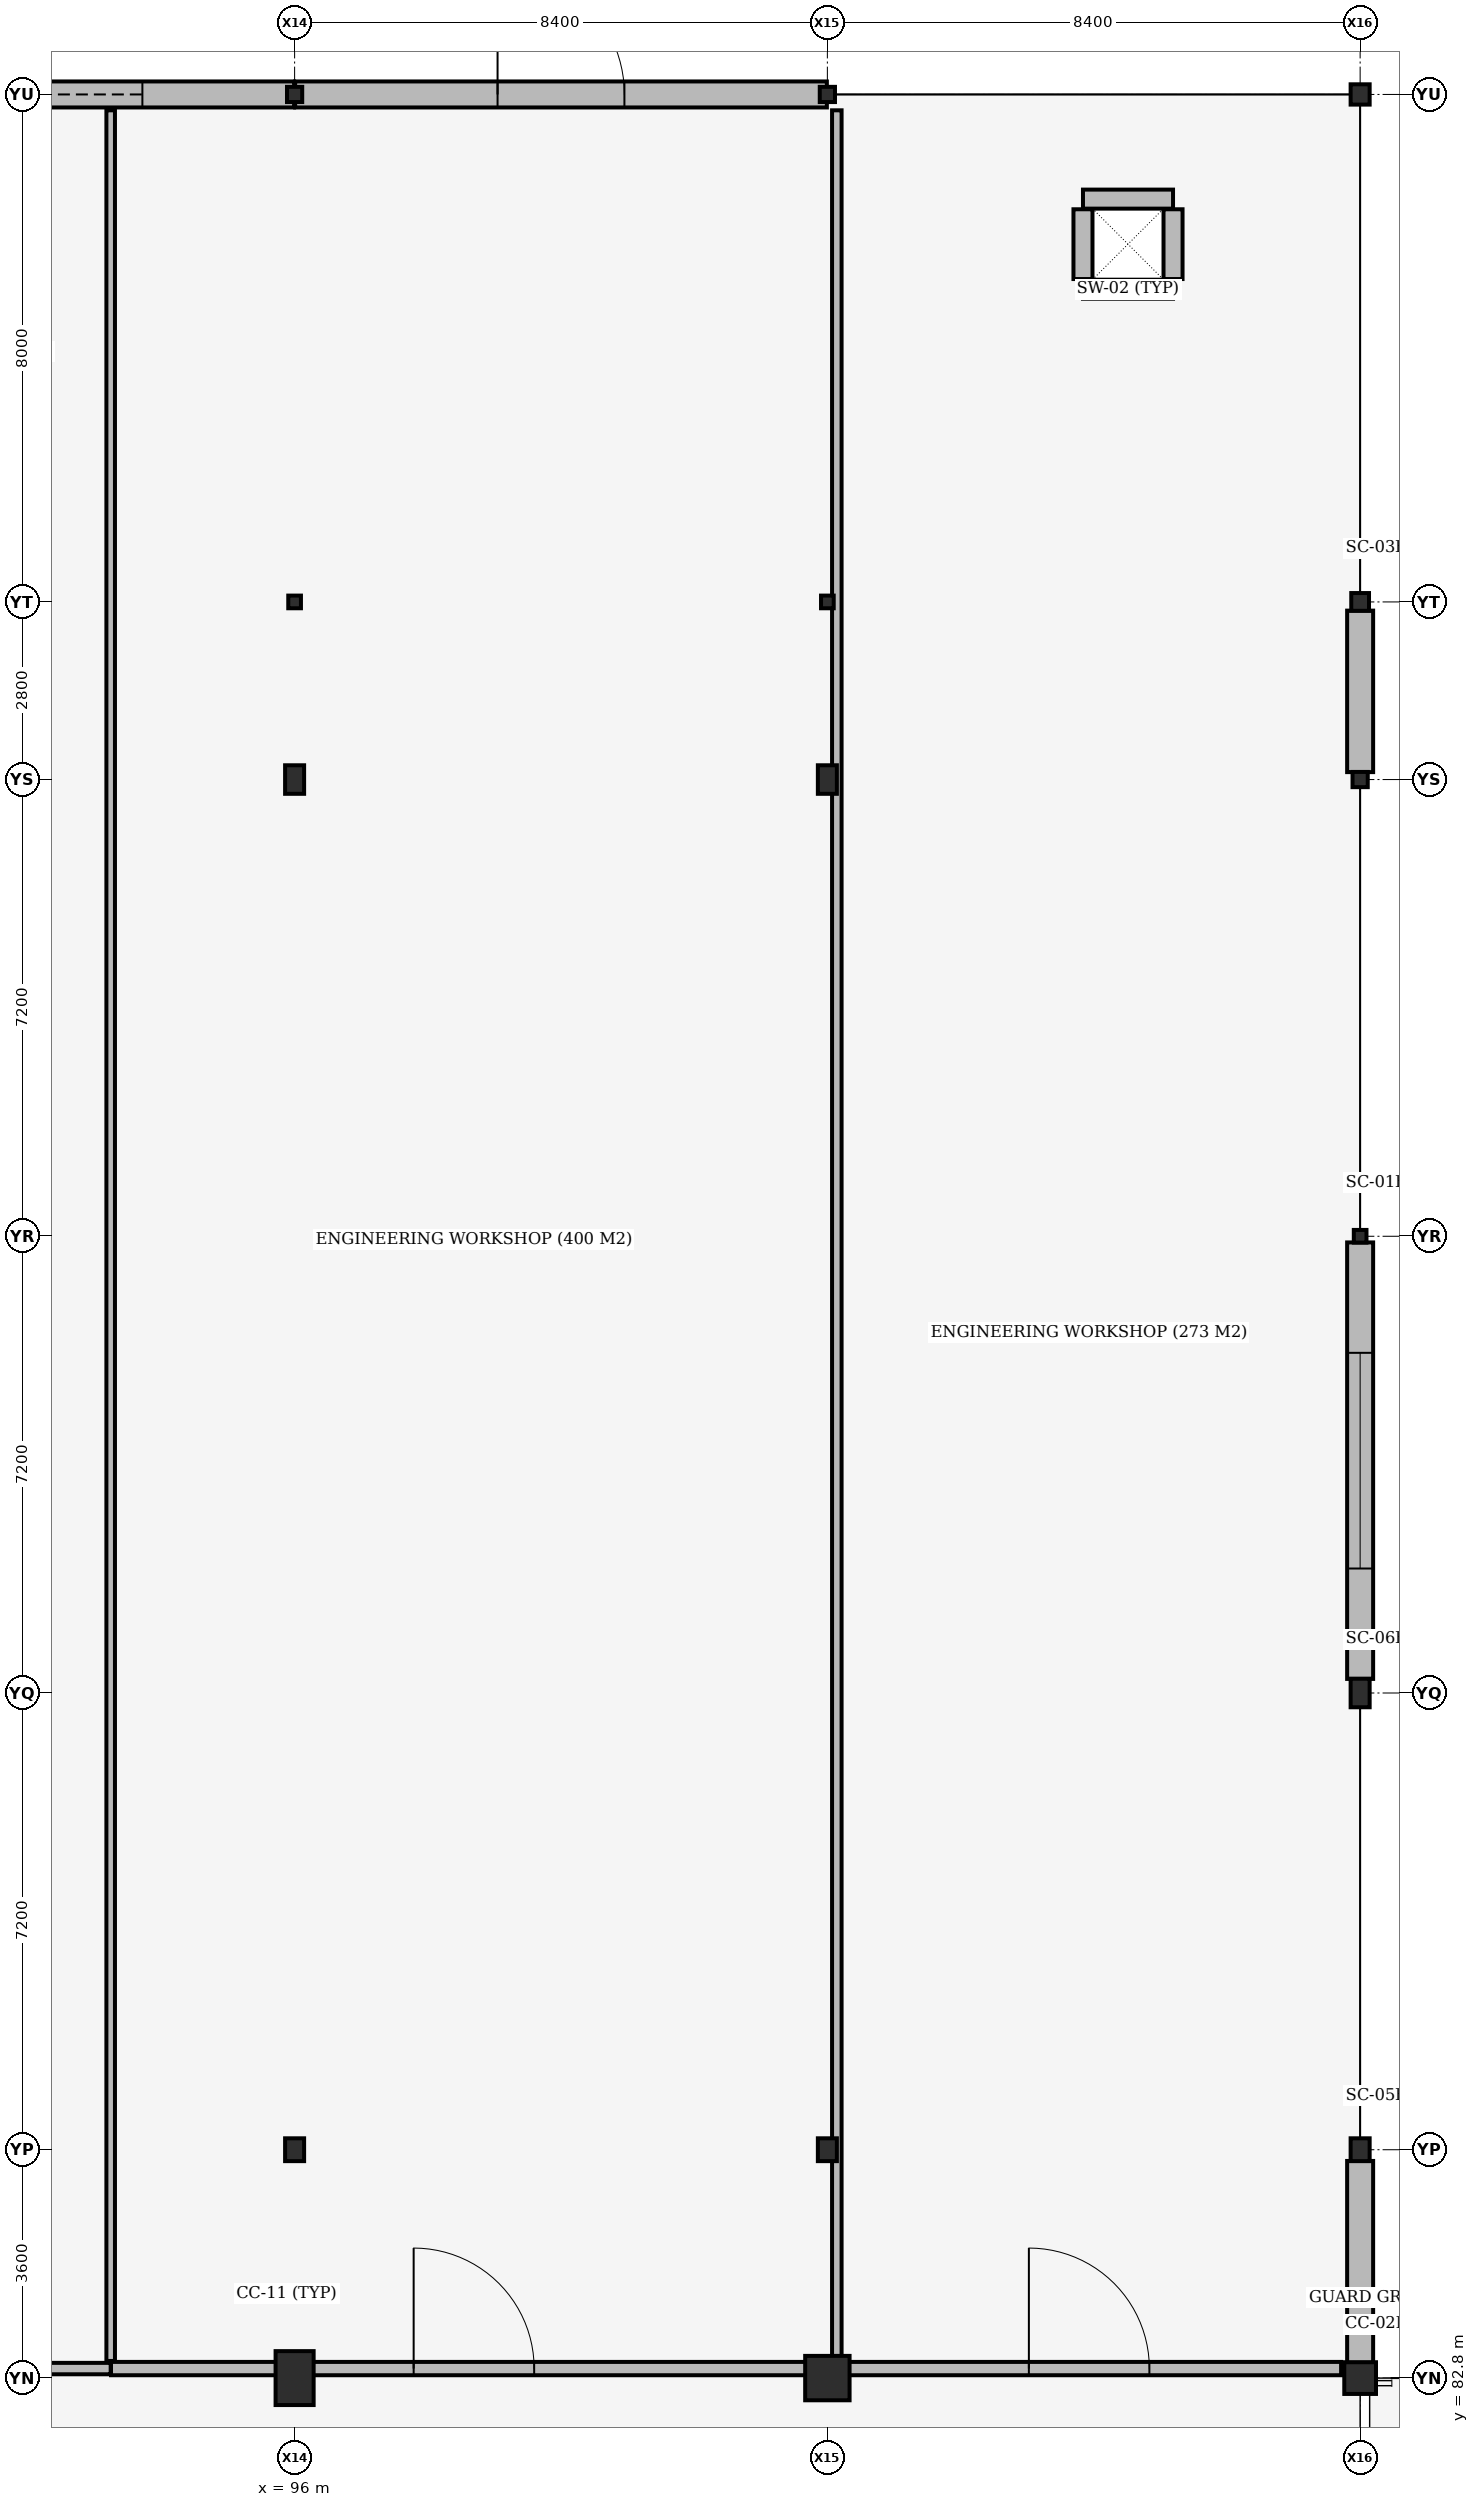
"""IFC4 building model, lengths in metres.
Left out: names, types, materials, properties, quantities, classifications, styles, units other than length and angle.
Written with IfcOpenShell. Run it as: python <this file> out.ifc"""

import sys

from ifc_helpers import new_model, si_unit, direction, frame, frame_2d, origin, origin_2d, place, context, subcontext, project, spatial, rectangle, i_section, extrude, element, fill, save


model = new_model("IFC4")
c1 = context("Model", 3, precision=1e-05, world=origin(), true_north=direction((0.0, 1.0)))
c2 = subcontext(c1, "Body", "Model", "MODEL_VIEW")
j1 = project(units=[si_unit("LENGTHUNIT", "METRE"), si_unit("PLANEANGLEUNIT", "RADIAN")], contexts=[c1])
p1 = place(None, origin())
s1 = spatial("IfcSite", under=j1, at=p1, CompositionType="ELEMENT")
p2 = place(p1, origin())
s2 = spatial("IfcBuilding", under=s1, at=p2, CompositionType="ELEMENT")
p3 = place(p2, origin())
s3 = spatial("IfcBuildingStorey", under=s2, at=p3, CompositionType="ELEMENT", Elevation=0.0)
p4 = place(p3, frame((108.43, 115.73, 0.0), z_axis=(0.0, 0.0, 1.0), x_axis=(1.0, 0.0, 0.0)))
e1 = element("IfcWall", 1, at=p4, inside=s3, PredefinedType="SHEAR", context=c2, shape_type="SweptSolid", body=[
    extrude(rectangle(XDim=1.42, YDim=0.3, at=frame_2d((0.71, 0.0))), origin(), (0.0, 0.0, 1.0), 5.16),
])
p5 = place(p3, frame((109.85, 115.89, 0.0), z_axis=(0.0, 0.0, 1.0), x_axis=(0.0, 1.0, 0.0)))
e2 = element("IfcWall", 2, at=p5, inside=s3, PredefinedType="SHEAR", context=c2, shape_type="SweptSolid", body=[
    extrude(rectangle(XDim=1.1, YDim=0.3, at=frame_2d((0.55, 0.0))), origin(), (0.0, 0.0, 1.0), 5.16),
])
p6 = place(p3, frame((109.85, 117.15, 0.0), z_axis=(0.0, 0.0, 1.0), x_axis=(-1.0, 0.0, 0.0)))
e3 = element("IfcWall", 3, at=p6, inside=s3, PredefinedType="SHEAR", context=c2, shape_type="SweptSolid", body=[
    extrude(rectangle(XDim=1.42, YDim=0.3, at=frame_2d((0.71, 0.0))), origin(), (0.0, 0.0, 1.0), 5.16),
])
p7 = place(p3, frame((108.43, 116.99, 0.0), z_axis=(0.0, 0.0, 1.0), x_axis=(0.0, -1.0, 0.0)))
e4 = element("IfcWall", 4, at=p7, inside=s3, PredefinedType="SHEAR", context=c2, shape_type="SweptSolid", body=[
    extrude(rectangle(XDim=1.1, YDim=0.3, at=frame_2d((0.55, 0.0))), origin(), (0.0, 0.0, 1.0), 5.16),
])
p8 = place(p3, frame((96.0, 82.8, 0.0), z_axis=(0.0, 0.0, 1.0), x_axis=(1.0, 0.0, 0.0)))
e5 = element("IfcColumn", 5, at=p8, inside=s3, PredefinedType="COLUMN", context=c2, shape_type="SweptSolid", body=[
    extrude(rectangle(XDim=0.6, YDim=0.85, at=origin_2d()), origin(), (0.0, 0.0, 1.0), 5.08),
])
p9 = place(p3, frame((96.0, 86.4, 0.0), z_axis=(0.0, 0.0, 1.0), x_axis=(1.0, 0.0, 0.0)))
e6 = element("IfcColumn", 6, at=p9, inside=s3, PredefinedType="COLUMN", context=c2, shape_type="SweptSolid", body=[
    extrude(i_section(OverallWidth=0.3, OverallDepth=0.36, WebThickness=0.012, FlangeThickness=0.022, FilletRadius=0.027, at=origin_2d()), origin(), (0.0, 0.0, 1.0), 5.08),
])
p10 = place(p3, frame((96.0, 108.0, 0.0), z_axis=(0.0, 0.0, 1.0), x_axis=(1.0, 0.0, 0.0)))
e7 = element("IfcColumn", 7, at=p10, inside=s3, PredefinedType="COLUMN", context=c2, shape_type="SweptSolid", body=[
    extrude(i_section(OverallWidth=0.3, OverallDepth=0.45, WebThickness=0.014, FlangeThickness=0.026, FilletRadius=0.027, at=origin_2d()), origin(), (0.0, 0.0, 1.0), 5.4),
])
p11 = place(p3, frame((96.0, 110.8, 0.0), z_axis=(0.0, 0.0, 1.0), x_axis=(1.0, 0.0, 0.0)))
e8 = element("IfcColumn", 8, at=p11, inside=s3, PredefinedType="COLUMN", context=c2, shape_type="SweptSolid", body=[
    extrude(i_section(OverallWidth=0.2, OverallDepth=0.2, WebThickness=0.009, FlangeThickness=0.015, FilletRadius=0.018, at=origin_2d()), origin(), (0.0, 0.0, 1.0), 5.16),
])
p12 = place(p3, frame((96.0, 118.8, 0.0), z_axis=(0.0, 0.0, 1.0), x_axis=(1.0, 0.0, 0.0)))
e9 = element("IfcColumn", 9, at=p12, inside=s3, PredefinedType="COLUMN", context=c2, shape_type="SweptSolid", body=[
    extrude(i_section(OverallWidth=0.24, OverallDepth=0.24, WebThickness=0.01, FlangeThickness=0.017, FilletRadius=0.021, at=origin_2d()), origin(), (0.0, 0.0, 1.0), 5.16),
])
p13 = place(p3, frame((104.4, 82.8, 0.0), z_axis=(0.0, 0.0, 1.0), x_axis=(1.0, 0.0, 0.0)))
e10 = element("IfcColumn", 10, at=p13, inside=s3, PredefinedType="COLUMN", context=c2, shape_type="SweptSolid", body=[
    extrude(rectangle(XDim=0.7, YDim=0.7, at=origin_2d()), origin(), (0.0, 0.0, 1.0), 5.08),
])
p14 = place(p3, frame((104.4, 86.4, 0.0), z_axis=(0.0, 0.0, 1.0), x_axis=(1.0, 0.0, 0.0)))
e11 = element("IfcColumn", 11, at=p14, inside=s3, PredefinedType="COLUMN", context=c2, shape_type="SweptSolid", body=[
    extrude(i_section(OverallWidth=0.3, OverallDepth=0.36, WebThickness=0.012, FlangeThickness=0.022, FilletRadius=0.027, at=origin_2d()), origin(), (0.0, 0.0, 1.0), 5.08),
])
p15 = place(p3, frame((104.4, 108.0, 0.0), z_axis=(0.0, 0.0, 1.0), x_axis=(1.0, 0.0, 0.0)))
e12 = element("IfcColumn", 12, at=p15, inside=s3, PredefinedType="COLUMN", context=c2, shape_type="SweptSolid", body=[
    extrude(i_section(OverallWidth=0.3, OverallDepth=0.45, WebThickness=0.014, FlangeThickness=0.026, FilletRadius=0.027, at=origin_2d()), origin(), (0.0, 0.0, 1.0), 5.4),
])
p16 = place(p3, frame((104.4, 110.8, 0.0), z_axis=(0.0, 0.0, 1.0), x_axis=(1.0, 0.0, 0.0)))
e13 = element("IfcColumn", 13, at=p16, inside=s3, PredefinedType="COLUMN", context=c2, shape_type="SweptSolid", body=[
    extrude(i_section(OverallWidth=0.2, OverallDepth=0.2, WebThickness=0.009, FlangeThickness=0.015, FilletRadius=0.018, at=origin_2d()), origin(), (0.0, 0.0, 1.0), 5.16),
])
p17 = place(p3, frame((104.4, 118.8, 0.0), z_axis=(0.0, 0.0, 1.0), x_axis=(1.0, 0.0, 0.0)))
e14 = element("IfcColumn", 14, at=p17, inside=s3, PredefinedType="COLUMN", context=c2, shape_type="SweptSolid", body=[
    extrude(i_section(OverallWidth=0.24, OverallDepth=0.24, WebThickness=0.01, FlangeThickness=0.017, FilletRadius=0.021, at=origin_2d()), origin(), (0.0, 0.0, 1.0), 5.16),
])
p18 = place(p3, frame((112.8, 82.8, 0.0), z_axis=(0.0, 0.0, 1.0), x_axis=(1.0, 0.0, 0.0)))
e15 = element("IfcColumn", 15, at=p18, inside=s3, PredefinedType="COLUMN", context=c2, shape_type="SweptSolid", body=[
    extrude(rectangle(XDim=0.5, YDim=0.5, at=origin_2d()), origin(), (0.0, 0.0, 1.0), 5.08),
])
p19 = place(p3, frame((112.8, 86.4, 0.0), z_axis=(0.0, 0.0, 1.0), x_axis=(1.0, 0.0, 0.0)))
e16 = element("IfcColumn", 16, at=p19, inside=s3, PredefinedType="COLUMN", context=c2, shape_type="SweptSolid", body=[
    extrude(i_section(OverallWidth=0.3, OverallDepth=0.36, WebThickness=0.012, FlangeThickness=0.022, FilletRadius=0.027, at=origin_2d()), origin(), (0.0, 0.0, 1.0), 5.08),
])
p20 = place(p3, frame((112.8, 93.6, 0.0), z_axis=(0.0, 0.0, 1.0), x_axis=(1.0, 0.0, 0.0)))
e17 = element("IfcColumn", 17, at=p20, inside=s3, PredefinedType="COLUMN", context=c2, shape_type="SweptSolid", body=[
    extrude(i_section(OverallWidth=0.3, OverallDepth=0.45, WebThickness=0.014, FlangeThickness=0.026, FilletRadius=0.027, at=origin_2d()), origin(), (0.0, 0.0, 1.0), 5.08),
])
p21 = place(p3, frame((112.8, 100.8, 0.0), z_axis=(0.0, 0.0, 1.0), x_axis=(1.0, 0.0, 0.0)))
e18 = element("IfcColumn", 18, at=p21, inside=s3, PredefinedType="COLUMN", context=c2, shape_type="SweptSolid", body=[
    extrude(i_section(OverallWidth=0.2, OverallDepth=0.2, WebThickness=0.009, FlangeThickness=0.015, FilletRadius=0.018, at=origin_2d()), origin(), (0.0, 0.0, 1.0), 5.08),
])
p22 = place(p3, frame((112.8, 108.0, 0.0), z_axis=(0.0, 0.0, 1.0), x_axis=(1.0, 0.0, 0.0)))
e19 = element("IfcColumn", 19, at=p22, inside=s3, PredefinedType="COLUMN", context=c2, shape_type="SweptSolid", body=[
    extrude(i_section(OverallWidth=0.24, OverallDepth=0.24, WebThickness=0.01, FlangeThickness=0.017, FilletRadius=0.021, at=origin_2d()), origin(), (0.0, 0.0, 1.0), 5.4),
])
p23 = place(p3, frame((112.8, 110.8, 0.0), z_axis=(0.0, 0.0, 1.0), x_axis=(1.0, 0.0, 0.0)))
e20 = element("IfcColumn", 20, at=p23, inside=s3, PredefinedType="COLUMN", context=c2, shape_type="SweptSolid", body=[
    extrude(i_section(OverallWidth=0.28, OverallDepth=0.28, WebThickness=0.01, FlangeThickness=0.018, FilletRadius=0.024, at=origin_2d()), origin(), (0.0, 0.0, 1.0), 5.16),
])
p24 = place(p3, frame((112.8, 118.8, 0.0), z_axis=(0.0, 0.0, 1.0), x_axis=(1.0, 0.0, 0.0)))
e21 = element("IfcColumn", 21, at=p24, inside=s3, PredefinedType="COLUMN", context=c2, shape_type="SweptSolid", body=[
    extrude(i_section(OverallWidth=0.3, OverallDepth=0.32, WebThickness=0.011, FlangeThickness=0.021, FilletRadius=0.027, at=origin_2d()), origin(), (0.0, 0.0, 1.0), 5.16),
])
p25 = place(p3, frame((87.608, 118.8, 0.0), z_axis=(0.0, 0.0, 1.0), x_axis=(1.0, 0.0, 0.0)))
e22 = element("IfcWall", 22, at=p25, inside=s3, PredefinedType="STANDARD", context=c2, shape_type="SweptSolid", body=[
    extrude(rectangle(XDim=8.384, YDim=0.41, at=frame_2d((4.192, 0.0))), origin(), (0.0, 0.0, 1.0), 5.08),
])
p26 = place(p25, frame((2.392, 0.0, 0.0)))
e23 = element("IfcOpeningElement", 23, at=p26, cuts=e22, PredefinedType="OPENING", context=c2, shape_type="SweptSolid", body=[
    extrude(rectangle(XDim=3.6, YDim=3.8, at=frame_2d((1.8, 1.9))), frame((0.0, 0.215, 0.0), z_axis=(0.0, -1.0, 0.0), x_axis=(1.0, 0.0, 0.0)), (0.0, 0.0, 1.0), 0.43),
])
p27 = place(p3, frame((96.008, 118.8, 0.0), z_axis=(0.0, 0.0, 1.0), x_axis=(1.0, 0.0, 0.0)))
e24 = element("IfcWall", 24, at=p27, inside=s3, PredefinedType="STANDARD", context=c2, shape_type="SweptSolid", body=[
    extrude(rectangle(XDim=8.384, YDim=0.41, at=frame_2d((4.192, 0.0))), origin(), (0.0, 0.0, 1.0), 5.08),
])
p28 = place(p27, frame((3.192, 0.0, 0.0)))
e25 = element("IfcOpeningElement", 25, at=p28, cuts=e24, PredefinedType="OPENING", context=c2, shape_type="SweptSolid", body=[
    extrude(rectangle(XDim=2.0, YDim=2.3, at=frame_2d((1.0, 1.15))), frame((0.0, 0.215, 0.0), z_axis=(0.0, -1.0, 0.0), x_axis=(1.0, 0.0, 0.0)), (0.0, 0.0, 1.0), 0.43),
])
p29 = place(p3, frame((112.8, 86.223, 0.0), z_axis=(0.0, 0.0, 1.0), x_axis=(0.0, -1.0, 0.0)))
e26 = element("IfcWall", 26, at=p29, inside=s3, PredefinedType="STANDARD", context=c2, shape_type="SweptSolid", body=[
    extrude(rectangle(XDim=3.181, YDim=0.41, at=frame_2d((1.59, 0.0))), origin(), (0.0, 0.0, 1.0), 4.28),
])
p30 = place(p3, frame((112.8, 100.703, 0.0), z_axis=(0.0, 0.0, 1.0), x_axis=(0.0, -1.0, 0.0)))
e27 = element("IfcWall", 27, at=p30, inside=s3, PredefinedType="STANDARD", context=c2, shape_type="SweptSolid", body=[
    extrude(rectangle(XDim=6.881, YDim=0.41, at=frame_2d((3.44, 0.0))), origin(), (0.0, 0.0, 1.0), 4.43),
])
p31 = place(p30, frame((1.74, 0.0, 1.6)))
e28 = element("IfcOpeningElement", 28, at=p31, cuts=e27, PredefinedType="OPENING", context=c2, shape_type="SweptSolid", body=[
    extrude(rectangle(XDim=3.4, YDim=1.5, at=frame_2d((1.7, 0.75))), frame((0.0, 0.215, 0.0), z_axis=(0.0, -1.0, 0.0), x_axis=(1.0, 0.0, 0.0)), (0.0, 0.0, 1.0), 0.43),
])
p32 = place(p3, frame((112.8, 110.663, 0.0), z_axis=(0.0, 0.0, 1.0), x_axis=(0.0, -1.0, 0.0)))
e29 = element("IfcWall", 29, at=p32, inside=s3, PredefinedType="STANDARD", context=c2, shape_type="SweptSolid", body=[
    extrude(rectangle(XDim=2.546, YDim=0.41, at=frame_2d((1.273, 0.0))), origin(), (0.0, 0.0, 1.0), 4.38),
])
p33 = place(p3, frame((83.405, 82.95, 0.0), z_axis=(0.0, 0.0, 1.0), x_axis=(1.0, 0.0, 0.0)))
e30 = element("IfcWall", 30, at=p33, inside=s3, PredefinedType="PARTITIONING", context=c2, shape_type="SweptSolid", body=[
    extrude(rectangle(XDim=9.695, YDim=0.18, at=frame_2d((4.848, 0.0))), origin(), (0.0, 0.0, 1.0), 4.28),
])
p34 = place(p33, frame((5.665, 0.0, 0.0)))
e31 = element("IfcOpeningElement", 31, at=p34, cuts=e30, PredefinedType="OPENING", context=c2, shape_type="SweptSolid", body=[
    extrude(rectangle(XDim=0.98, YDim=2.18, at=frame_2d((0.49, 1.09))), frame((0.0, 0.1, 0.0), z_axis=(0.0, -1.0, 0.0), x_axis=(1.0, 0.0, 0.0)), (0.0, 0.0, 1.0), 0.2),
])
p35 = place(p3, frame((93.1, 83.07, 0.0), z_axis=(0.0, 0.0, 1.0), x_axis=(0.0, 1.0, 0.0)))
e32 = element("IfcWall", 32, at=p35, inside=s3, PredefinedType="PARTITIONING", context=c2, shape_type="SweptSolid", body=[
    extrude(rectangle(XDim=35.48, YDim=0.135, at=frame_2d((17.74, 0.0))), origin(), (0.0, 0.0, 1.0), 4.33),
])
p36 = place(p3, frame((93.105, 82.95, 0.0), z_axis=(0.0, 0.0, 1.0), x_axis=(1.0, 0.0, 0.0)))
e33 = element("IfcWall", 33, at=p36, inside=s3, PredefinedType="STANDARD", context=c2, shape_type="SweptSolid", body=[
    extrude(rectangle(XDim=11.444, YDim=0.21, at=frame_2d((5.722, 0.0))), origin(), (0.0, 0.0, 1.0), 4.33),
])
p37 = place(p36, frame((4.772, 0.0, 0.0)))
e34 = element("IfcOpeningElement", 34, at=p37, cuts=e33, PredefinedType="OPENING", context=c2, shape_type="SweptSolid", body=[
    extrude(rectangle(XDim=1.9, YDim=2.35, at=frame_2d((0.95, 1.175))), frame((0.0, 0.115, 0.0), z_axis=(0.0, -1.0, 0.0), x_axis=(1.0, 0.0, 0.0)), (0.0, 0.0, 1.0), 0.23),
])
p38 = place(p3, frame((104.549, 83.07, 0.0), z_axis=(0.0, 0.0, 1.0), x_axis=(0.0, 1.0, 0.0)))
e35 = element("IfcWall", 35, at=p38, inside=s3, PredefinedType="PARTITIONING", context=c2, shape_type="SweptSolid", body=[
    extrude(rectangle(XDim=35.48, YDim=0.15, at=frame_2d((17.74, 0.0))), origin(), (0.0, 0.0, 1.0), 4.38),
])
p39 = place(p3, frame((104.554, 82.95, 0.0), z_axis=(0.0, 0.0, 1.0), x_axis=(1.0, 0.0, 0.0)))
e36 = element("IfcWall", 36, at=p39, inside=s3, PredefinedType="STANDARD", context=c2, shape_type="SweptSolid", body=[
    extrude(rectangle(XDim=7.946, YDim=0.21, at=frame_2d((3.973, 0.0))), origin(), (0.0, 0.0, 1.0), 4.33),
])
p40 = place(p39, frame((3.023, 0.0, 0.0)))
e37 = element("IfcOpeningElement", 37, at=p40, cuts=e36, PredefinedType="OPENING", context=c2, shape_type="SweptSolid", body=[
    extrude(rectangle(XDim=1.9, YDim=2.35, at=frame_2d((0.95, 1.175))), frame((0.0, 0.115, 0.0), z_axis=(0.0, -1.0, 0.0), x_axis=(1.0, 0.0, 0.0)), (0.0, 0.0, 1.0), 0.23),
])
p41 = place(p26, origin())
e38 = element("IfcDoor", 38, at=p41, inside=s3, OperationType="ROLLINGUP", PredefinedType="GATE", context=c2, shape_type="SweptSolid", body=[
    extrude(rectangle(XDim=3.6, YDim=3.8, at=frame_2d((1.8, 1.9))), frame((0.0, 0.025, 0.0), z_axis=(0.0, -1.0, 0.0), x_axis=(1.0, 0.0, 0.0)), (0.0, 0.0, 1.0), 0.05),
])
fill(e23, e38)
p42 = place(p28, origin())
e39 = element("IfcDoor", 39, at=p42, inside=s3, OperationType="DOUBLE_DOOR_SINGLE_SWING", PredefinedType="DOOR", context=c2, shape_type="SweptSolid", body=[
    extrude(rectangle(XDim=2.0, YDim=2.3, at=frame_2d((1.0, 1.15))), frame((0.0, 0.025, 0.0), z_axis=(0.0, -1.0, 0.0), x_axis=(1.0, 0.0, 0.0)), (0.0, 0.0, 1.0), 0.05),
])
fill(e25, e39)
p43 = place(p31, origin())
e40 = element("IfcWindow", 40, at=p43, inside=s3, PartitioningType="DOUBLE_PANEL_VERTICAL", PredefinedType="WINDOW", context=c2, shape_type="SweptSolid", body=[
    extrude(rectangle(XDim=3.4, YDim=1.5, at=frame_2d((1.7, 0.75))), frame((0.0, 0.03, 0.0), z_axis=(0.0, -1.0, 0.0), x_axis=(1.0, 0.0, 0.0)), (0.0, 0.0, 1.0), 0.06),
])
fill(e28, e40)
p44 = place(p37, origin())
e41 = element("IfcDoor", 41, at=p44, inside=s3, OperationType="DOUBLE_DOOR_SINGLE_SWING", PredefinedType="DOOR", context=c2, shape_type="SweptSolid", body=[
    extrude(rectangle(XDim=1.9, YDim=2.35, at=frame_2d((0.95, 1.175))), frame((0.0, 0.025, 0.0), z_axis=(0.0, -1.0, 0.0), x_axis=(1.0, 0.0, 0.0)), (0.0, 0.0, 1.0), 0.05),
])
fill(e34, e41)
p45 = place(p40, origin())
e42 = element("IfcDoor", 42, at=p45, inside=s3, OperationType="DOUBLE_DOOR_SINGLE_SWING", PredefinedType="DOOR", context=c2, shape_type="SweptSolid", body=[
    extrude(rectangle(XDim=1.9, YDim=2.35, at=frame_2d((0.95, 1.175))), frame((0.0, 0.025, 0.0), z_axis=(0.0, -1.0, 0.0), x_axis=(1.0, 0.0, 0.0)), (0.0, 0.0, 1.0), 0.05),
])
fill(e37, e42)
save(model, sys.argv[1])
